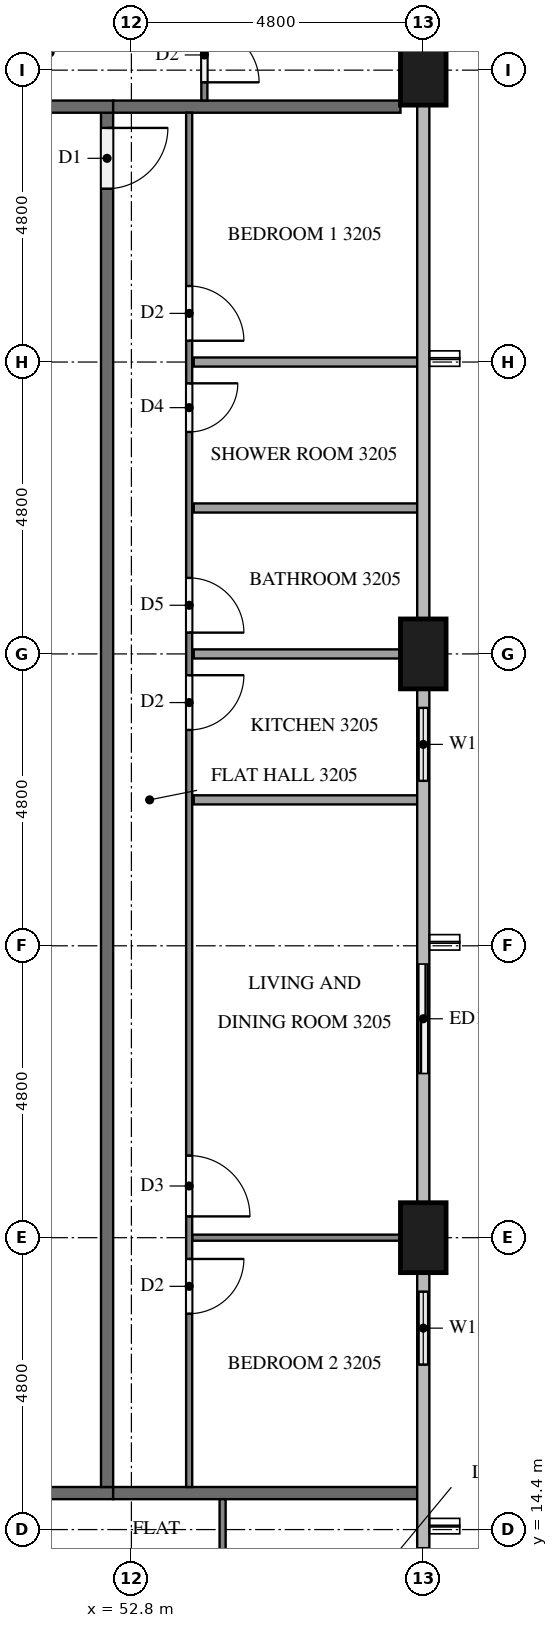
"""IFC4 building model, lengths in metres.
Left out: names, types, materials, properties, quantities, classifications, styles, units other than length and angle.
Written with IfcOpenShell. Run it as: python <this file> out.ifc"""

import sys

from ifc_helpers import new_model, si_unit, direction, frame, frame_2d, origin, origin_2d, place, context, subcontext, project, spatial, rectangle, extrude, element, fill, save


model = new_model("IFC4")
c1 = context("Model", 3, precision=1e-05, world=origin(), true_north=direction((0.0, 1.0)))
c2 = subcontext(c1, "Body", "Model", "MODEL_VIEW")
j1 = project(units=[si_unit("LENGTHUNIT", "METRE"), si_unit("PLANEANGLEUNIT", "RADIAN")], contexts=[c1])
p1 = place(None, origin())
s1 = spatial("IfcSite", under=j1, at=p1, CompositionType="ELEMENT")
p2 = place(p1, origin())
s2 = spatial("IfcBuilding", under=s1, at=p2, CompositionType="ELEMENT")
p3 = place(p2, frame((0.0, 0.0, 126.1)))
s3 = spatial("IfcBuildingStorey", under=s2, at=p3, CompositionType="ELEMENT", Elevation=126.1)
for number, where, z_axis, x_axis in (
    (1, (57.6, 19.2, 0.0), (0.0, 0.0, 1.0), (0.0, 1.0, 0.0)),
    (2, (57.6, 28.8, 0.0), (0.0, 0.0, 1.0), (0.0, 1.0, 0.0)),
    (3, (57.6, 38.4, 0.0), (0.0, 0.0, 1.0), (0.0, 1.0, 0.0)),
):
    element("IfcColumn", number, at=place(p3, frame(where, z_axis=z_axis, x_axis=x_axis)), inside=s3, PredefinedType="COLUMN", context=c2, shape_type="SweptSolid", body=[
        extrude(rectangle(XDim=1.15, YDim=0.75, at=origin_2d()), origin(), (0.0, 0.0, 1.0), 3.2),
    ])
p4 = place(p3, frame((57.6, 12.0, 0.0), z_axis=(0.0, 0.0, 1.0), x_axis=(0.0, 1.0, 0.0)))
e4 = element("IfcWall", 4, at=p4, inside=s3, PredefinedType="SOLIDWALL", context=c2, shape_type="SweptSolid", body=[
    extrude(rectangle(XDim=2.4, YDim=0.15, at=frame_2d((1.2, 0.0))), origin(), (0.0, 0.0, 1.0), 3.2),
])
p5 = place(p4, frame((0.3, 0.0, 0.0)))
e5 = element("IfcOpeningElement", 5, at=p5, cuts=e4, PredefinedType="OPENING", context=c2, shape_type="SweptSolid", body=[
    extrude(rectangle(XDim=1.8, YDim=2.4, at=frame_2d((0.9, 1.2))), frame((0.0, 0.085, 0.0), z_axis=(0.0, -1.0, 0.0), x_axis=(1.0, 0.0, 0.0)), (0.0, 0.0, 1.0), 0.17),
])
p6 = place(p3, frame((57.6, 16.8, 0.0), z_axis=(0.0, 0.0, 1.0), x_axis=(0.0, 1.0, 0.0)))
e6 = element("IfcWall", 6, at=p6, inside=s3, PredefinedType="SOLIDWALL", context=c2, shape_type="SweptSolid", body=[
    extrude(rectangle(XDim=1.825, YDim=0.15, at=frame_2d((0.913, 0.0))), origin(), (0.0, 0.0, 1.0), 3.2),
])
p7 = place(p6, frame((0.312, 0.0, 0.9)))
e7 = element("IfcOpeningElement", 7, at=p7, cuts=e6, PredefinedType="OPENING", context=c2, shape_type="SweptSolid", body=[
    extrude(rectangle(XDim=1.2, YDim=1.4, at=frame_2d((0.6, 0.7))), frame((0.0, 0.085, 0.0), z_axis=(0.0, -1.0, 0.0), x_axis=(1.0, 0.0, 0.0)), (0.0, 0.0, 1.0), 0.17),
])
p8 = place(p3, frame((57.6, 21.6, 0.0), z_axis=(0.0, 0.0, 1.0), x_axis=(0.0, 1.0, 0.0)))
e8 = element("IfcWall", 8, at=p8, inside=s3, PredefinedType="SOLIDWALL", context=c2, shape_type="SweptSolid", body=[
    extrude(rectangle(XDim=2.4, YDim=0.15, at=frame_2d((1.2, 0.0))), origin(), (0.0, 0.0, 1.0), 3.2),
])
p9 = place(p8, frame((0.3, 0.0, 0.0)))
e9 = element("IfcOpeningElement", 9, at=p9, cuts=e8, PredefinedType="OPENING", context=c2, shape_type="SweptSolid", body=[
    extrude(rectangle(XDim=1.8, YDim=2.4, at=frame_2d((0.9, 1.2))), frame((0.0, 0.085, 0.0), z_axis=(0.0, -1.0, 0.0), x_axis=(1.0, 0.0, 0.0)), (0.0, 0.0, 1.0), 0.17),
])
p10 = place(p3, frame((57.6, 26.4, 0.0), z_axis=(0.0, 0.0, 1.0), x_axis=(0.0, 1.0, 0.0)))
e10 = element("IfcWall", 10, at=p10, inside=s3, PredefinedType="SOLIDWALL", context=c2, shape_type="SweptSolid", body=[
    extrude(rectangle(XDim=1.825, YDim=0.15, at=frame_2d((0.913, 0.0))), origin(), (0.0, 0.0, 1.0), 3.2),
])
p11 = place(p10, frame((0.312, 0.0, 0.9)))
e11 = element("IfcOpeningElement", 11, at=p11, cuts=e10, PredefinedType="OPENING", context=c2, shape_type="SweptSolid", body=[
    extrude(rectangle(XDim=1.2, YDim=1.4, at=frame_2d((0.6, 0.7))), frame((0.0, 0.085, 0.0), z_axis=(0.0, -1.0, 0.0), x_axis=(1.0, 0.0, 0.0)), (0.0, 0.0, 1.0), 0.17),
])
p12 = place(p3, frame((50.3, 15.0, 0.0), z_axis=(0.0, 0.0, 1.0), x_axis=(1.0, 0.0, 0.0)))
e12 = element("IfcWall", 12, at=p12, inside=s3, PredefinedType="PARTITIONING", context=c2, shape_type="SweptSolid", body=[
    extrude(rectangle(XDim=2.2, YDim=0.2, at=frame_2d((1.1, 0.0))), origin(), (0.0, 0.0, 1.0), 3.2),
])
p13 = place(p3, frame((52.4, 37.7, 0.0), z_axis=(0.0, 0.0, 1.0), x_axis=(0.0, -1.0, 0.0)))
e13 = element("IfcWall", 13, at=p13, inside=s3, PredefinedType="PARTITIONING", context=c2, shape_type="SweptSolid", body=[
    extrude(rectangle(XDim=22.6, YDim=0.2, at=frame_2d((11.3, 0.0))), origin(), (0.0, 0.0, 1.0), 3.2),
])
p14 = place(p13, frame((0.25, 0.0, 0.0)))
e14 = element("IfcOpeningElement", 14, at=p14, cuts=e13, PredefinedType="OPENING", context=c2, shape_type="SweptSolid", body=[
    extrude(rectangle(XDim=1.0, YDim=2.1, at=frame_2d((0.5, 1.05))), frame((0.0, 0.11, 0.0), z_axis=(0.0, -1.0, 0.0), x_axis=(1.0, 0.0, 0.0)), (0.0, 0.0, 1.0), 0.22),
])
p15 = place(p3, frame((52.5, 37.8, 0.0), z_axis=(0.0, 0.0, 1.0), x_axis=(-1.0, 0.0, 0.0)))
e15 = element("IfcWall", 15, at=p15, inside=s3, PredefinedType="PARTITIONING", context=c2, shape_type="SweptSolid", body=[
    extrude(rectangle(XDim=2.2, YDim=0.2, at=frame_2d((1.1, 0.0))), origin(), (0.0, 0.0, 1.0), 3.2),
])
p16 = place(p3, frame((52.5, 15.0, 0.0), z_axis=(0.0, 0.0, 1.0), x_axis=(1.0, 0.0, 0.0)))
e16 = element("IfcWall", 16, at=p16, inside=s3, PredefinedType="PARTITIONING", context=c2, shape_type="SweptSolid", body=[
    extrude(rectangle(XDim=5.0, YDim=0.2, at=frame_2d((2.5, 0.0))), origin(), (0.0, 0.0, 1.0), 3.2),
])
p17 = place(p3, frame((52.5, 37.8, 0.0), z_axis=(0.0, 0.0, 1.0), x_axis=(1.0, 0.0, 0.0)))
e17 = element("IfcWall", 17, at=p17, inside=s3, PredefinedType="PARTITIONING", context=c2, shape_type="SweptSolid", body=[
    extrude(rectangle(XDim=4.725, YDim=0.2, at=frame_2d((2.363, 0.0))), origin(), (0.0, 0.0, 1.0), 3.2),
])
p18 = place(p3, frame((54.3, 14.9, 0.0), z_axis=(0.0, 0.0, 1.0), x_axis=(0.0, -1.0, 0.0)))
e18 = element("IfcWall", 18, at=p18, inside=s3, PredefinedType="PARTITIONING", context=c2, shape_type="SweptSolid", body=[
    extrude(rectangle(XDim=9.598, YDim=0.1, at=frame_2d((4.799, 0.0))), origin(), (0.0, 0.0, 1.0), 3.2),
])
p19 = place(p18, frame((3.95, 0.0, 0.0)))
e19 = element("IfcOpeningElement", 19, at=p19, cuts=e18, PredefinedType="OPENING", context=c2, shape_type="SweptSolid", body=[
    extrude(rectangle(XDim=1.0, YDim=2.1, at=frame_2d((0.5, 1.05))), frame((0.0, 0.06, 0.0), z_axis=(0.0, -1.0, 0.0), x_axis=(1.0, 0.0, 0.0)), (0.0, 0.0, 1.0), 0.12),
])
p20 = place(p18, frame((5.65, 0.0, 0.0)))
e20 = element("IfcOpeningElement", 20, at=p20, cuts=e18, PredefinedType="OPENING", context=c2, shape_type="SweptSolid", body=[
    extrude(rectangle(XDim=0.9, YDim=2.1, at=frame_2d((0.45, 1.05))), frame((0.0, 0.06, 0.0), z_axis=(0.0, -1.0, 0.0), x_axis=(1.0, 0.0, 0.0)), (0.0, 0.0, 1.0), 0.12),
])
for number, where, z_axis, x_axis in (
    (21, (53.825, 33.6, 0.0), (0.0, 0.0, 1.0), (1.0, 0.0, 0.0)),
    (22, (53.825, 31.2, 0.0), (0.0, 0.0, 1.0), (1.0, 0.0, 0.0)),
):
    element("IfcWall", number, at=place(p3, frame(where, z_axis=z_axis, x_axis=x_axis)), inside=s3, PredefinedType="PARTITIONING", context=c2, shape_type="SweptSolid", body=[
        extrude(rectangle(XDim=3.675, YDim=0.15, at=frame_2d((1.837, 0.0))), origin(), (0.0, 0.0, 1.0), 3.2),
    ])
p21 = place(p3, frame((53.825, 28.8, 0.0), z_axis=(0.0, 0.0, 1.0), x_axis=(1.0, 0.0, 0.0)))
e23 = element("IfcWall", 23, at=p21, inside=s3, PredefinedType="PARTITIONING", context=c2, shape_type="SweptSolid", body=[
    extrude(rectangle(XDim=3.4, YDim=0.15, at=frame_2d((1.7, 0.0))), origin(), (0.0, 0.0, 1.0), 3.2),
])
p22 = place(p3, frame((53.825, 26.4, 0.0), z_axis=(0.0, 0.0, 1.0), x_axis=(1.0, 0.0, 0.0)))
e24 = element("IfcWall", 24, at=p22, inside=s3, PredefinedType="PARTITIONING", context=c2, shape_type="SweptSolid", body=[
    extrude(rectangle(XDim=3.675, YDim=0.15, at=frame_2d((1.837, 0.0))), origin(), (0.0, 0.0, 1.0), 3.2),
])
p23 = place(p3, frame((53.8, 19.2, 0.0), z_axis=(0.0, 0.0, 1.0), x_axis=(1.0, 0.0, 0.0)))
e25 = element("IfcWall", 25, at=p23, inside=s3, PredefinedType="PARTITIONING", context=c2, shape_type="SweptSolid", body=[
    extrude(rectangle(XDim=3.425, YDim=0.1, at=frame_2d((1.712, 0.0))), origin(), (0.0, 0.0, 1.0), 3.2),
])
p24 = place(p3, frame((53.75, 37.7, 0.0), z_axis=(0.0, 0.0, 1.0), x_axis=(0.0, -1.0, 0.0)))
e26 = element("IfcWall", 26, at=p24, inside=s3, PredefinedType="PARTITIONING", context=c2, shape_type="SweptSolid", body=[
    extrude(rectangle(XDim=22.6, YDim=0.1, at=frame_2d((11.3, 0.0))), origin(), (0.0, 0.0, 1.0), 3.2),
])
p25 = place(p24, frame((2.85, 0.0, 0.0)))
e27 = element("IfcOpeningElement", 27, at=p25, cuts=e26, PredefinedType="OPENING", context=c2, shape_type="SweptSolid", body=[
    extrude(rectangle(XDim=0.9, YDim=2.1, at=frame_2d((0.45, 1.05))), frame((0.0, 0.06, 0.0), z_axis=(0.0, -1.0, 0.0), x_axis=(1.0, 0.0, 0.0)), (0.0, 0.0, 1.0), 0.12),
])
p26 = place(p24, frame((4.45, 0.0, 0.0)))
e28 = element("IfcOpeningElement", 28, at=p26, cuts=e26, PredefinedType="OPENING", context=c2, shape_type="SweptSolid", body=[
    extrude(rectangle(XDim=0.8, YDim=2.1, at=frame_2d((0.4, 1.05))), frame((0.0, 0.06, 0.0), z_axis=(0.0, -1.0, 0.0), x_axis=(1.0, 0.0, 0.0)), (0.0, 0.0, 1.0), 0.12),
])
p27 = place(p24, frame((7.65, 0.0, 0.0)))
e29 = element("IfcOpeningElement", 29, at=p27, cuts=e26, PredefinedType="OPENING", context=c2, shape_type="SweptSolid", body=[
    extrude(rectangle(XDim=0.9, YDim=2.1, at=frame_2d((0.45, 1.05))), frame((0.0, 0.06, 0.0), z_axis=(0.0, -1.0, 0.0), x_axis=(1.0, 0.0, 0.0)), (0.0, 0.0, 1.0), 0.12),
])
p28 = place(p24, frame((9.25, 0.0, 0.0)))
e30 = element("IfcOpeningElement", 30, at=p28, cuts=e26, PredefinedType="OPENING", context=c2, shape_type="SweptSolid", body=[
    extrude(rectangle(XDim=0.9, YDim=2.1, at=frame_2d((0.45, 1.05))), frame((0.0, 0.06, 0.0), z_axis=(0.0, -1.0, 0.0), x_axis=(1.0, 0.0, 0.0)), (0.0, 0.0, 1.0), 0.12),
])
p29 = place(p24, frame((17.15, 0.0, 0.0)))
e31 = element("IfcOpeningElement", 31, at=p29, cuts=e26, PredefinedType="OPENING", context=c2, shape_type="SweptSolid", body=[
    extrude(rectangle(XDim=1.0, YDim=2.1, at=frame_2d((0.5, 1.05))), frame((0.0, 0.06, 0.0), z_axis=(0.0, -1.0, 0.0), x_axis=(1.0, 0.0, 0.0)), (0.0, 0.0, 1.0), 0.12),
])
p30 = place(p24, frame((18.85, 0.0, 0.0)))
e32 = element("IfcOpeningElement", 32, at=p30, cuts=e26, PredefinedType="OPENING", context=c2, shape_type="SweptSolid", body=[
    extrude(rectangle(XDim=0.9, YDim=2.1, at=frame_2d((0.45, 1.05))), frame((0.0, 0.06, 0.0), z_axis=(0.0, -1.0, 0.0), x_axis=(1.0, 0.0, 0.0)), (0.0, 0.0, 1.0), 0.12),
])
p31 = place(p3, frame((54.0, 52.378, 0.0), z_axis=(0.0, 0.0, 1.0), x_axis=(0.0, -1.0, 0.0)))
e33 = element("IfcWall", 33, at=p31, inside=s3, PredefinedType="PARTITIONING", context=c2, shape_type="SweptSolid", body=[
    extrude(rectangle(XDim=14.479, YDim=0.1, at=frame_2d((7.239, 0.0))), origin(), (0.0, 0.0, 1.0), 3.2),
])
p32 = place(p31, frame((13.279, 0.0, 0.0)))
e34 = element("IfcOpeningElement", 34, at=p32, cuts=e33, PredefinedType="OPENING", context=c2, shape_type="SweptSolid", body=[
    extrude(rectangle(XDim=0.9, YDim=2.1, at=frame_2d((0.45, 1.05))), frame((0.0, 0.06, 0.0), z_axis=(0.0, -1.0, 0.0), x_axis=(1.0, 0.0, 0.0)), (0.0, 0.0, 1.0), 0.12),
])
p33 = place(p31, frame((4.729, 0.0, 0.0)))
e35 = element("IfcOpeningElement", 35, at=p33, cuts=e33, PredefinedType="OPENING", context=c2, shape_type="SweptSolid", body=[
    extrude(rectangle(XDim=1.0, YDim=2.1, at=frame_2d((0.5, 1.05))), frame((0.0, 0.06, 0.0), z_axis=(0.0, -1.0, 0.0), x_axis=(1.0, 0.0, 0.0)), (0.0, 0.0, 1.0), 0.12),
])
p34 = place(p31, frame((3.128, 0.0, 0.0)))
e36 = element("IfcOpeningElement", 36, at=p34, cuts=e33, PredefinedType="OPENING", context=c2, shape_type="SweptSolid", body=[
    extrude(rectangle(XDim=0.9, YDim=2.1, at=frame_2d((0.45, 1.05))), frame((0.0, 0.06, 0.0), z_axis=(0.0, -1.0, 0.0), x_axis=(1.0, 0.0, 0.0)), (0.0, 0.0, 1.0), 0.12),
])
p35 = place(p7, origin())
e37 = element("IfcWindow", 37, at=p35, inside=s3, PartitioningType="SINGLE_PANEL", PredefinedType="WINDOW", context=c2, shape_type="SweptSolid", body=[
    extrude(rectangle(XDim=1.2, YDim=1.4, at=frame_2d((0.6, 0.7))), frame((0.0, 0.03, 0.0), z_axis=(0.0, -1.0, 0.0), x_axis=(1.0, 0.0, 0.0)), (0.0, 0.0, 1.0), 0.06),
])
fill(e7, e37)
p36 = place(p9, origin())
e38 = element("IfcDoor", 38, at=p36, inside=s3, OperationType="SLIDING_TO_RIGHT", PredefinedType="DOOR", context=c2, shape_type="SweptSolid", body=[
    extrude(rectangle(XDim=1.8, YDim=2.4, at=frame_2d((0.9, 1.2))), frame((0.0, 0.025, 0.0), z_axis=(0.0, -1.0, 0.0), x_axis=(1.0, 0.0, 0.0)), (0.0, 0.0, 1.0), 0.05),
])
fill(e9, e38)
p37 = place(p11, origin())
e39 = element("IfcWindow", 39, at=p37, inside=s3, PartitioningType="SINGLE_PANEL", PredefinedType="WINDOW", context=c2, shape_type="SweptSolid", body=[
    extrude(rectangle(XDim=1.2, YDim=1.4, at=frame_2d((0.6, 0.7))), frame((0.0, 0.03, 0.0), z_axis=(0.0, -1.0, 0.0), x_axis=(1.0, 0.0, 0.0)), (0.0, 0.0, 1.0), 0.06),
])
fill(e11, e39)
p38 = place(p14, origin())
e40 = element("IfcDoor", 40, at=p38, inside=s3, OperationType="SINGLE_SWING_LEFT", PredefinedType="DOOR", context=c2, shape_type="SweptSolid", body=[
    extrude(rectangle(XDim=1.0, YDim=2.1, at=frame_2d((0.5, 1.05))), frame((0.0, 0.025, 0.0), z_axis=(0.0, -1.0, 0.0), x_axis=(1.0, 0.0, 0.0)), (0.0, 0.0, 1.0), 0.05),
])
fill(e14, e40)
p39 = place(p25, origin())
e41 = element("IfcDoor", 41, at=p39, inside=s3, OperationType="SINGLE_SWING_RIGHT", PredefinedType="DOOR", context=c2, shape_type="SweptSolid", body=[
    extrude(rectangle(XDim=0.9, YDim=2.1, at=frame_2d((0.45, 1.05))), frame((0.0, 0.025, 0.0), z_axis=(0.0, -1.0, 0.0), x_axis=(1.0, 0.0, 0.0)), (0.0, 0.0, 1.0), 0.05),
])
fill(e27, e41)
p40 = place(p26, origin())
e42 = element("IfcDoor", 42, at=p40, inside=s3, OperationType="SINGLE_SWING_LEFT", PredefinedType="DOOR", context=c2, shape_type="SweptSolid", body=[
    extrude(rectangle(XDim=0.8, YDim=2.1, at=frame_2d((0.4, 1.05))), frame((0.0, 0.025, 0.0), z_axis=(0.0, -1.0, 0.0), x_axis=(1.0, 0.0, 0.0)), (0.0, 0.0, 1.0), 0.05),
])
fill(e28, e42)
p41 = place(p27, origin())
e43 = element("IfcDoor", 43, at=p41, inside=s3, OperationType="SINGLE_SWING_RIGHT", PredefinedType="DOOR", context=c2, shape_type="SweptSolid", body=[
    extrude(rectangle(XDim=0.9, YDim=2.1, at=frame_2d((0.45, 1.05))), frame((0.0, 0.025, 0.0), z_axis=(0.0, -1.0, 0.0), x_axis=(1.0, 0.0, 0.0)), (0.0, 0.0, 1.0), 0.05),
])
fill(e29, e43)
p42 = place(p28, origin())
e44 = element("IfcDoor", 44, at=p42, inside=s3, OperationType="SINGLE_SWING_LEFT", PredefinedType="DOOR", context=c2, shape_type="SweptSolid", body=[
    extrude(rectangle(XDim=0.9, YDim=2.1, at=frame_2d((0.45, 1.05))), frame((0.0, 0.025, 0.0), z_axis=(0.0, -1.0, 0.0), x_axis=(1.0, 0.0, 0.0)), (0.0, 0.0, 1.0), 0.05),
])
fill(e30, e44)
p43 = place(p29, origin())
e45 = element("IfcDoor", 45, at=p43, inside=s3, OperationType="SINGLE_SWING_RIGHT", PredefinedType="DOOR", context=c2, shape_type="SweptSolid", body=[
    extrude(rectangle(XDim=1.0, YDim=2.1, at=frame_2d((0.5, 1.05))), frame((0.0, 0.025, 0.0), z_axis=(0.0, -1.0, 0.0), x_axis=(1.0, 0.0, 0.0)), (0.0, 0.0, 1.0), 0.05),
])
fill(e31, e45)
p44 = place(p30, origin())
e46 = element("IfcDoor", 46, at=p44, inside=s3, OperationType="SINGLE_SWING_LEFT", PredefinedType="DOOR", context=c2, shape_type="SweptSolid", body=[
    extrude(rectangle(XDim=0.9, YDim=2.1, at=frame_2d((0.45, 1.05))), frame((0.0, 0.025, 0.0), z_axis=(0.0, -1.0, 0.0), x_axis=(1.0, 0.0, 0.0)), (0.0, 0.0, 1.0), 0.05),
])
fill(e32, e46)
p45 = place(p32, origin())
e47 = element("IfcDoor", 47, at=p45, inside=s3, OperationType="SINGLE_SWING_RIGHT", PredefinedType="DOOR", context=c2, shape_type="SweptSolid", body=[
    extrude(rectangle(XDim=0.9, YDim=2.1, at=frame_2d((0.45, 1.05))), frame((0.0, 0.025, 0.0), z_axis=(0.0, -1.0, 0.0), x_axis=(1.0, 0.0, 0.0)), (0.0, 0.0, 1.0), 0.05),
])
fill(e34, e47)
save(model, sys.argv[1])
